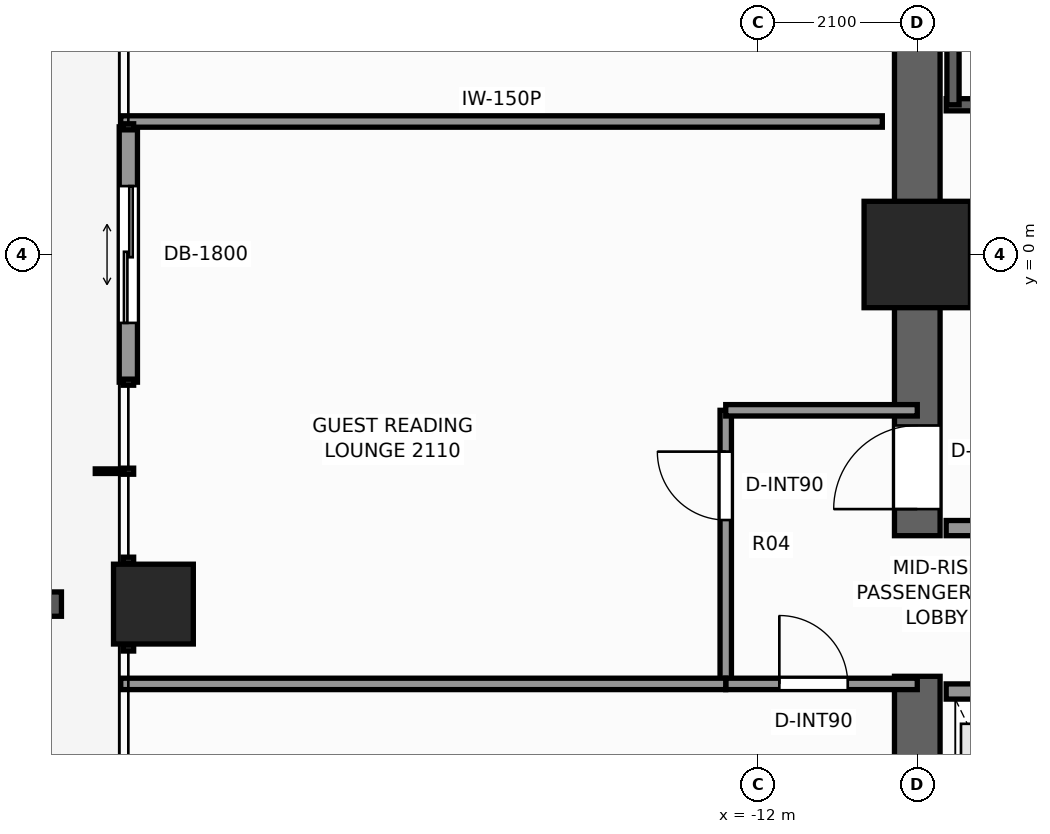
"""IFC4 building model, lengths in metres.
Left out: names, types, materials, properties, quantities, classifications, styles, units other than length and angle.
Written with IfcOpenShell. Run it as: python <this file> out.ifc"""

import sys

from ifc_helpers import new_model, si_unit, direction, frame, frame_2d, origin, origin_2d, place, context, subcontext, project, spatial, rectangle, extrude, element, fill, save


model = new_model("IFC4")
c1 = context("Model", 3, precision=1e-05, world=origin(), true_north=direction((0.0, 1.0)))
c2 = subcontext(c1, "Body", "Model", "MODEL_VIEW")
j1 = project(units=[si_unit("LENGTHUNIT", "METRE"), si_unit("PLANEANGLEUNIT", "RADIAN")], contexts=[c1])
p1 = place(None, origin())
s1 = spatial("IfcSite", under=j1, at=p1, CompositionType="ELEMENT")
p2 = place(p1, origin())
s2 = spatial("IfcBuilding", under=s1, at=p2, CompositionType="ELEMENT")
p3 = place(p2, frame((0.0, 0.0, 75.5)))
s3 = spatial("IfcBuildingStorey", under=s2, at=p3, CompositionType="ELEMENT", Elevation=75.5)
p4 = place(p3, frame((-9.9, -9.6, 0.0), z_axis=(0.0, 0.0, 1.0), x_axis=(0.0, 1.0, 0.0)))
e1 = element("IfcWall", 1, at=p4, inside=s3, PredefinedType="SHEAR", context=c2, shape_type="SweptSolid", body=[
    extrude(rectangle(XDim=4.05, YDim=0.6, at=frame_2d((2.025, 0.0))), origin(), (0.0, 0.0, 1.0), 3.3),
])
p5 = place(p3, frame((-9.9, -3.7, 0.0), z_axis=(0.0, 0.0, 1.0), x_axis=(0.0, 1.0, 0.0)))
e2 = element("IfcWall", 2, at=p5, inside=s3, PredefinedType="SHEAR", context=c2, shape_type="SweptSolid", body=[
    extrude(rectangle(XDim=13.3, YDim=0.6, at=frame_2d((6.65, 0.0))), origin(), (0.0, 0.0, 1.0), 3.3),
])
p6 = place(p5, frame((0.35, 0.0, 0.0)))
e3 = element("IfcOpeningElement", 3, at=p6, cuts=e2, PredefinedType="OPENING", context=c2, shape_type="SweptSolid", body=[
    extrude(rectangle(XDim=1.1, YDim=2.2, at=frame_2d((0.55, 1.1))), frame((0.0, 0.31, 0.0), z_axis=(0.0, -1.0, 0.0), x_axis=(1.0, 0.0, 0.0)), (0.0, 0.0, 1.0), 0.62),
])
p7 = place(p3, frame((-9.9, 0.0, 0.0), z_axis=(0.0, 0.0, 1.0), x_axis=(1.0, 0.0, 0.0)))
e4 = element("IfcColumn", 4, at=p7, inside=s3, PredefinedType="COLUMN", context=c2, shape_type="SweptSolid", body=[
    extrude(rectangle(XDim=1.4, YDim=1.4, at=origin_2d()), origin(), (0.0, 0.0, 1.0), 3.3),
])
p8 = place(p3, frame((-19.95, -4.6, 0.0), z_axis=(0.0, 0.0, 1.0), x_axis=(1.0, 0.0, 0.0)))
e5 = element("IfcColumn", 5, at=p8, inside=s3, PredefinedType="COLUMN", context=c2, shape_type="SweptSolid", body=[
    extrude(rectangle(XDim=1.05, YDim=1.05, at=origin_2d()), origin(), (0.0, 0.0, 1.0), 3.3),
])
p9 = place(p3, frame((-20.28, -1.68, 0.0), z_axis=(0.0, 0.0, 1.0), x_axis=(0.0, 1.0, 0.0)))
e6 = element("IfcWall", 6, at=p9, inside=s3, PredefinedType="STANDARD", context=c2, shape_type="SweptSolid", body=[
    extrude(rectangle(XDim=3.36, YDim=0.24, at=frame_2d((1.68, 0.0))), origin(), (0.0, 0.0, 1.0), 3.08),
])
p10 = place(p9, frame((0.78, 0.0, 0.0)))
e7 = element("IfcOpeningElement", 7, at=p10, cuts=e6, PredefinedType="OPENING", context=c2, shape_type="SweptSolid", body=[
    extrude(rectangle(XDim=1.8, YDim=2.2, at=frame_2d((0.9, 1.1))), frame((0.0, 0.13, 0.0), z_axis=(0.0, -1.0, 0.0), x_axis=(1.0, 0.0, 0.0)), (0.0, 0.0, 1.0), 0.26),
])
p11 = place(p3, frame((-9.52, 1.97, 0.0), z_axis=(0.0, 0.0, 1.0), x_axis=(1.0, 0.0, 0.0)))
e8 = element("IfcWall", 8, at=p11, inside=s3, PredefinedType="SHEAR", context=c2, shape_type="SweptSolid", body=[
    extrude(rectangle(XDim=3.52, YDim=0.16, at=frame_2d((1.76, 0.0))), origin(), (0.0, 0.0, 1.0), 3.3),
])
p12 = place(p11, frame((1.15, 0.0, 0.0)))
e9 = element("IfcOpeningElement", 9, at=p12, cuts=e8, PredefinedType="OPENING", context=c2, shape_type="SweptSolid", body=[
    extrude(rectangle(XDim=1.1, YDim=2.2, at=frame_2d((0.55, 1.1))), frame((0.0, 0.09, 0.0), z_axis=(0.0, -1.0, 0.0), x_axis=(1.0, 0.0, 0.0)), (0.0, 0.0, 1.0), 0.18),
])
p13 = place(p3, frame((-9.43, 1.97, 0.0), z_axis=(0.0, 0.0, 1.0), x_axis=(0.0, 1.0, 0.0)))
e10 = element("IfcWall", 10, at=p13, inside=s3, PredefinedType="SHEAR", context=c2, shape_type="SweptSolid", body=[
    extrude(rectangle(XDim=7.56, YDim=0.16, at=frame_2d((3.78, 0.0))), origin(), (0.0, 0.0, 1.0), 3.3),
])
p14 = place(p3, frame((-9.52, -3.6, 0.0), z_axis=(0.0, 0.0, 1.0), x_axis=(1.0, 0.0, 0.0)))
e11 = element("IfcWall", 11, at=p14, inside=s3, PredefinedType="SOLIDWALL", context=c2, shape_type="SweptSolid", body=[
    extrude(rectangle(XDim=3.77, YDim=0.2, at=frame_2d((1.885, 0.0))), origin(), (0.0, 0.0, 1.0), 3.08),
])
p15 = place(p14, frame((1.15, 0.0, 0.0)))
e12 = element("IfcOpeningElement", 12, at=p15, cuts=e11, PredefinedType="OPENING", context=c2, shape_type="SweptSolid", body=[
    extrude(rectangle(XDim=0.95, YDim=2.06, at=frame_2d((0.475, 1.03))), frame((0.0, 0.11, 0.0), z_axis=(0.0, -1.0, 0.0), x_axis=(1.0, 0.0, 0.0)), (0.0, 0.0, 1.0), 0.22),
])
p16 = place(p3, frame((-9.52, -5.75, 0.0), z_axis=(0.0, 0.0, 1.0), x_axis=(1.0, 0.0, 0.0)))
e13 = element("IfcWall", 13, at=p16, inside=s3, PredefinedType="SOLIDWALL", context=c2, shape_type="SweptSolid", body=[
    extrude(rectangle(XDim=5.66, YDim=0.2, at=frame_2d((2.83, 0.0))), origin(), (0.0, 0.0, 1.0), 3.08),
])
p17 = place(p16, frame((0.55, 0.0, 0.0)))
e14 = element("IfcOpeningElement", 14, at=p17, cuts=e13, PredefinedType="OPENING", context=c2, shape_type="SweptSolid", body=[
    extrude(rectangle(XDim=1.1, YDim=2.2, at=frame_2d((0.55, 1.1))), frame((0.0, 0.11, 0.0), z_axis=(0.0, -1.0, 0.0), x_axis=(1.0, 0.0, 0.0)), (0.0, 0.0, 1.0), 0.22),
])
p18 = place(p16, frame((2.48, 0.0, 0.0)))
e15 = element("IfcOpeningElement", 15, at=p18, cuts=e13, PredefinedType="OPENING", context=c2, shape_type="SweptSolid", body=[
    extrude(rectangle(XDim=1.1, YDim=2.2, at=frame_2d((0.55, 1.1))), frame((0.0, 0.11, 0.0), z_axis=(0.0, -1.0, 0.0), x_axis=(1.0, 0.0, 0.0)), (0.0, 0.0, 1.0), 0.22),
])
p19 = place(p16, frame((4.41, 0.0, 0.0)))
e16 = element("IfcOpeningElement", 16, at=p19, cuts=e13, PredefinedType="OPENING", context=c2, shape_type="SweptSolid", body=[
    extrude(rectangle(XDim=1.1, YDim=2.2, at=frame_2d((0.55, 1.1))), frame((0.0, 0.11, 0.0), z_axis=(0.0, -1.0, 0.0), x_axis=(1.0, 0.0, 0.0)), (0.0, 0.0, 1.0), 0.22),
])
p20 = place(p3, frame((-12.42, -5.65, 0.0), z_axis=(0.0, 0.0, 1.0), x_axis=(0.0, 1.0, 0.0)))
e17 = element("IfcWall", 17, at=p20, inside=s3, PredefinedType="PARTITIONING", context=c2, shape_type="SweptSolid", body=[
    extrude(rectangle(XDim=3.6, YDim=0.15, at=frame_2d((1.8, 0.0))), origin(), (0.0, 0.0, 1.0), 2.292),
])
p21 = place(p20, frame((2.156, 0.0, 0.0)))
e18 = element("IfcOpeningElement", 18, at=p21, cuts=e17, PredefinedType="OPENING", context=c2, shape_type="SweptSolid", body=[
    extrude(rectangle(XDim=0.9, YDim=2.06, at=frame_2d((0.45, 1.03))), frame((0.0, 0.085, 0.0), z_axis=(0.0, -1.0, 0.0), x_axis=(1.0, 0.0, 0.0)), (0.0, 0.0, 1.0), 0.17),
])
p22 = place(p3, frame((-12.42, -2.05, 0.0), z_axis=(0.0, 0.0, 1.0), x_axis=(1.0, 0.0, 0.0)))
e19 = element("IfcWall", 19, at=p22, inside=s3, PredefinedType="PARTITIONING", context=c2, shape_type="SweptSolid", body=[
    extrude(rectangle(XDim=2.52, YDim=0.15, at=frame_2d((1.26, 0.0))), origin(), (0.0, 0.0, 1.0), 3.08),
])
p23 = place(p3, frame((-12.42, -5.65, 0.0), z_axis=(0.0, 0.0, 1.0), x_axis=(1.0, 0.0, 0.0)))
e20 = element("IfcWall", 20, at=p23, inside=s3, PredefinedType="PARTITIONING", context=c2, shape_type="SweptSolid", body=[
    extrude(rectangle(XDim=2.52, YDim=0.15, at=frame_2d((1.26, 0.0))), origin(), (0.0, 0.0, 1.0), 3.08),
])
p24 = place(p23, frame((0.705, 0.0, 0.0)))
e21 = element("IfcOpeningElement", 21, at=p24, cuts=e20, PredefinedType="OPENING", context=c2, shape_type="SweptSolid", body=[
    extrude(rectangle(XDim=0.9, YDim=2.06, at=frame_2d((0.45, 1.03))), frame((0.0, 0.085, 0.0), z_axis=(0.0, -1.0, 0.0), x_axis=(1.0, 0.0, 0.0)), (0.0, 0.0, 1.0), 0.17),
])
p25 = place(p3, frame((-20.38, 1.75, 0.0), z_axis=(0.0, 0.0, 1.0), x_axis=(1.0, 0.0, 0.0)))
e22 = element("IfcWall", 22, at=p25, inside=s3, PredefinedType="PARTITIONING", context=c2, shape_type="SweptSolid", body=[
    extrude(rectangle(XDim=10.02, YDim=0.15, at=frame_2d((5.01, 0.0))), origin(), (0.0, 0.0, 1.0), 2.449),
])
p26 = place(p3, frame((-20.38, -5.65, 0.0), z_axis=(0.0, 0.0, 1.0), x_axis=(1.0, 0.0, 0.0)))
e23 = element("IfcWall", 23, at=p26, inside=s3, PredefinedType="PARTITIONING", context=c2, shape_type="SweptSolid", body=[
    extrude(rectangle(XDim=7.96, YDim=0.15, at=frame_2d((3.98, 0.0))), origin(), (0.0, 0.0, 1.0), 2.449),
])
p27 = place(p10, origin())
e24 = element("IfcDoor", 24, at=p27, inside=s3, OperationType="DOUBLE_DOOR_SLIDING", PredefinedType="DOOR", context=c2, shape_type="SweptSolid", body=[
    extrude(rectangle(XDim=1.8, YDim=2.2, at=frame_2d((0.9, 1.1))), frame((0.0, 0.025, 0.0), z_axis=(0.0, -1.0, 0.0), x_axis=(1.0, 0.0, 0.0)), (0.0, 0.0, 1.0), 0.05),
])
fill(e7, e24)
p28 = place(p6, origin())
e25 = element("IfcDoor", 25, at=p28, inside=s3, OperationType="SINGLE_SWING_LEFT", PredefinedType="DOOR", context=c2, shape_type="SweptSolid", body=[
    extrude(rectangle(XDim=1.1, YDim=2.2, at=frame_2d((0.55, 1.1))), frame((0.0, 0.025, 0.0), z_axis=(0.0, -1.0, 0.0), x_axis=(1.0, 0.0, 0.0)), (0.0, 0.0, 1.0), 0.05),
])
fill(e3, e25)
p29 = place(p21, origin())
e26 = element("IfcDoor", 26, at=p29, inside=s3, OperationType="SINGLE_SWING_RIGHT", PredefinedType="DOOR", context=c2, shape_type="SweptSolid", body=[
    extrude(rectangle(XDim=0.9, YDim=2.06, at=frame_2d((0.45, 1.03))), frame((0.0, 0.025, 0.0), z_axis=(0.0, -1.0, 0.0), x_axis=(1.0, 0.0, 0.0)), (0.0, 0.0, 1.0), 0.05),
])
fill(e18, e26)
p30 = place(p24, origin())
e27 = element("IfcDoor", 27, at=p30, inside=s3, OperationType="SINGLE_SWING_LEFT", PredefinedType="DOOR", context=c2, shape_type="SweptSolid", body=[
    extrude(rectangle(XDim=0.9, YDim=2.06, at=frame_2d((0.45, 1.03))), frame((0.0, 0.025, 0.0), z_axis=(0.0, -1.0, 0.0), x_axis=(1.0, 0.0, 0.0)), (0.0, 0.0, 1.0), 0.05),
])
fill(e21, e27)
save(model, sys.argv[1])
